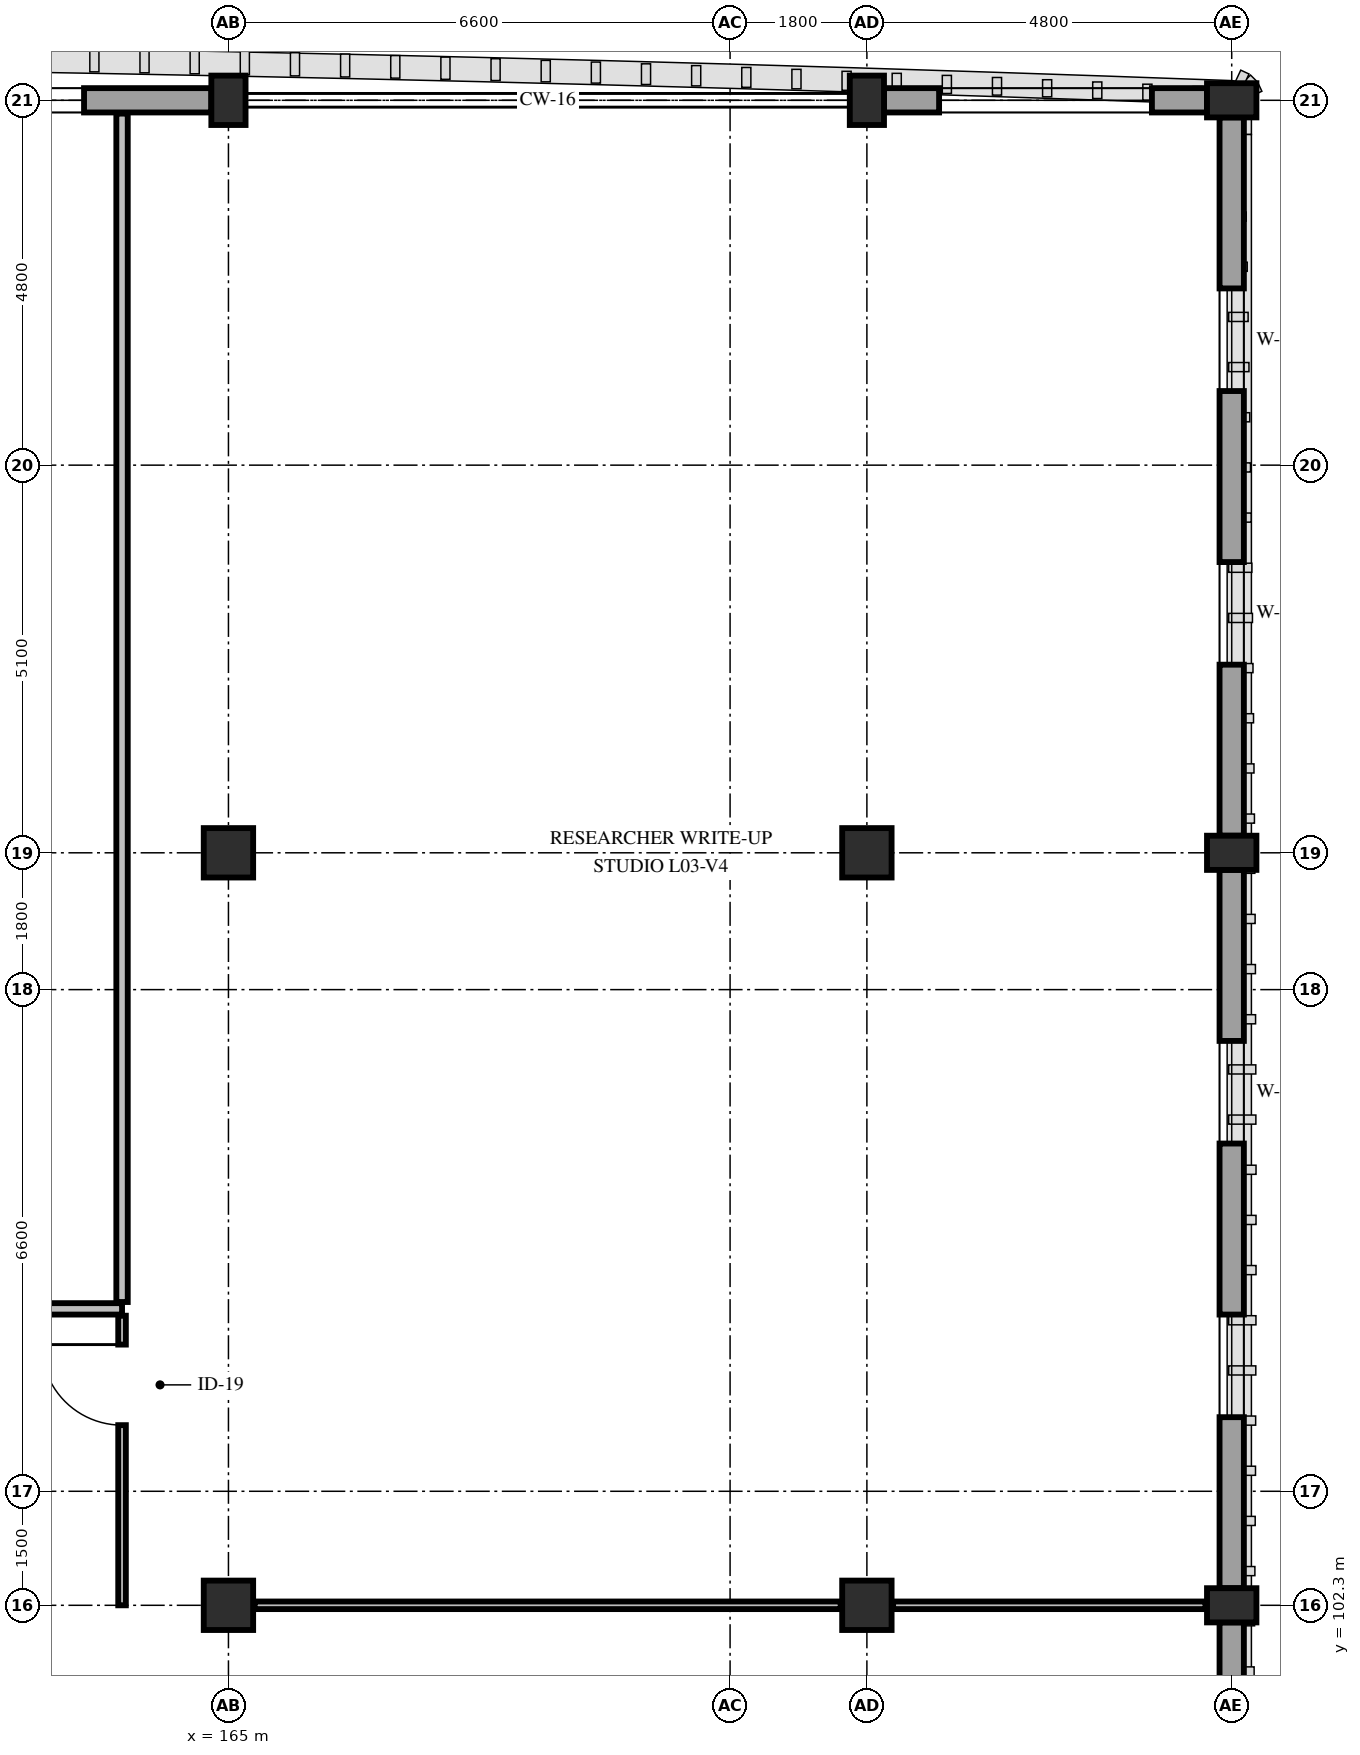
"""IFC4 building model, lengths in metres.
Left out: names, types, materials, properties, quantities, classifications, styles, units other than length and angle.
Written with IfcOpenShell. Run it as: python <this file> out.ifc"""

import sys

from ifc_helpers import new_model, si_unit, direction, frame, frame_2d, origin, origin_2d, place, context, subcontext, project, spatial, rectangle, extrude, element, fill, save


model = new_model("IFC4")
c1 = context("Model", 3, precision=1e-05, world=origin(), true_north=direction((0.0, 1.0)))
c2 = subcontext(c1, "Body", "Model", "MODEL_VIEW")
j1 = project(units=[si_unit("LENGTHUNIT", "METRE"), si_unit("PLANEANGLEUNIT", "RADIAN")], contexts=[c1])
p1 = place(None, origin())
s1 = spatial("IfcSite", under=j1, at=p1, CompositionType="ELEMENT")
p2 = place(p1, origin())
s2 = spatial("IfcBuilding", under=s1, at=p2, CompositionType="ELEMENT")
p3 = place(p2, frame((0.0, 0.0, 15.0)))
s3 = spatial("IfcBuildingStorey", under=s2, at=p3, CompositionType="ELEMENT", Elevation=15.0)
for number, where, z_axis, x_axis in (
    (1, (165.0, 102.3, 0.0), (0.0, 0.0, 1.0), (1.0, 0.0, 0.0)),
    (2, (165.0, 112.2, 0.0), (0.0, 0.0, 1.0), (1.0, 0.0, 0.0)),
):
    element("IfcColumn", number, at=place(p3, frame(where, z_axis=z_axis, x_axis=x_axis)), inside=s3, PredefinedType="COLUMN", context=c2, shape_type="SweptSolid", body=[
        extrude(rectangle(XDim=0.65, YDim=0.65, at=origin_2d()), origin(), (0.0, 0.0, 1.0), 4.8),
    ])
p4 = place(p3, frame((165.0, 122.1, 0.0), z_axis=(0.0, 0.0, 1.0), x_axis=(1.0, 0.0, 0.0)))
e3 = element("IfcColumn", 3, at=p4, inside=s3, PredefinedType="PILASTER", context=c2, shape_type="SweptSolid", body=[
    extrude(rectangle(XDim=0.45, YDim=0.65, at=origin_2d()), origin(), (0.0, 0.0, 1.0), 4.8),
])
for number, where, z_axis, x_axis in (
    (4, (173.4, 102.3, 0.0), (0.0, 0.0, 1.0), (1.0, 0.0, 0.0)),
    (5, (173.4, 112.2, 0.0), (0.0, 0.0, 1.0), (1.0, 0.0, 0.0)),
):
    element("IfcColumn", number, at=place(p3, frame(where, z_axis=z_axis, x_axis=x_axis)), inside=s3, PredefinedType="COLUMN", context=c2, shape_type="SweptSolid", body=[
        extrude(rectangle(XDim=0.65, YDim=0.65, at=origin_2d()), origin(), (0.0, 0.0, 1.0), 4.8),
    ])
for number, where, z_axis, x_axis in (
    (6, (173.4, 122.1, 0.0), (0.0, 0.0, 1.0), (1.0, 0.0, 0.0)),
    (7, (178.2, 102.3, 0.0), (0.0, 0.0, 1.0), (0.0, 1.0, 0.0)),
    (8, (178.2, 112.2, 0.0), (0.0, 0.0, 1.0), (0.0, 1.0, 0.0)),
    (9, (178.2, 122.1, 0.0), (0.0, 0.0, 1.0), (0.0, 1.0, 0.0)),
):
    element("IfcColumn", number, at=place(p3, frame(where, z_axis=z_axis, x_axis=x_axis)), inside=s3, PredefinedType="PILASTER", context=c2, shape_type="SweptSolid", body=[
        extrude(rectangle(XDim=0.45, YDim=0.65, at=origin_2d()), origin(), (0.0, 0.0, 1.0), 4.8),
    ])
p5 = place(p3, frame((158.625, 122.1, 0.0), z_axis=(0.0, 0.0, 1.0), x_axis=(1.0, 0.0, 0.0)))
e10 = element("IfcWall", 10, at=p5, inside=s3, PredefinedType="STANDARD", context=c2, shape_type="SweptSolid", body=[
    extrude(rectangle(XDim=6.15, YDim=0.32, at=frame_2d((3.075, 0.0))), origin(), (0.0, 0.0, 1.0), 3.78),
])
p6 = place(p5, frame((1.675, 0.0, 0.85)))
e11 = element("IfcOpeningElement", 11, at=p6, cuts=e10, PredefinedType="OPENING", context=c2, shape_type="SweptSolid", body=[
    extrude(rectangle(XDim=2.8, YDim=1.88, at=frame_2d((1.4, 0.94))), frame((0.0, 0.175, 0.0), z_axis=(0.0, -1.0, 0.0), x_axis=(1.0, 0.0, 0.0)), (0.0, 0.0, 1.0), 0.35),
])
p7 = place(p3, frame((173.625, 122.1, 0.0), z_axis=(0.0, 0.0, 1.0), x_axis=(1.0, 0.0, 0.0)))
e12 = element("IfcWall", 12, at=p7, inside=s3, PredefinedType="STANDARD", context=c2, shape_type="SweptSolid", body=[
    extrude(rectangle(XDim=4.25, YDim=0.32, at=frame_2d((2.125, 0.0))), origin(), (0.0, 0.0, 1.0), 3.78),
])
p8 = place(p7, frame((0.725, 0.0, 0.85)))
e13 = element("IfcOpeningElement", 13, at=p8, cuts=e12, PredefinedType="OPENING", context=c2, shape_type="SweptSolid", body=[
    extrude(rectangle(XDim=2.8, YDim=1.88, at=frame_2d((1.4, 0.94))), frame((0.0, 0.175, 0.0), z_axis=(0.0, -1.0, 0.0), x_axis=(1.0, 0.0, 0.0)), (0.0, 0.0, 1.0), 0.35),
])
p9 = place(p3, frame((178.2, 121.875, 0.0), z_axis=(0.0, 0.0, 1.0), x_axis=(0.0, -1.0, 0.0)))
e14 = element("IfcWall", 14, at=p9, inside=s3, PredefinedType="STANDARD", context=c2, shape_type="SweptSolid", body=[
    extrude(rectangle(XDim=9.45, YDim=0.32, at=frame_2d((4.725, 0.0))), origin(), (0.0, 0.0, 1.0), 3.95),
])
p10 = place(p9, frame((2.25, 0.0, 0.85)))
e15 = element("IfcOpeningElement", 15, at=p10, cuts=e14, PredefinedType="OPENING", context=c2, shape_type="SweptSolid", body=[
    extrude(rectangle(XDim=1.35, YDim=2.08, at=frame_2d((0.675, 1.04))), frame((0.0, 0.175, 0.0), z_axis=(0.0, -1.0, 0.0), x_axis=(1.0, 0.0, 0.0)), (0.0, 0.0, 1.0), 0.35),
])
p11 = place(p9, frame((5.85, 0.0, 0.85)))
e16 = element("IfcOpeningElement", 16, at=p11, cuts=e14, PredefinedType="OPENING", context=c2, shape_type="SweptSolid", body=[
    extrude(rectangle(XDim=1.35, YDim=2.08, at=frame_2d((0.675, 1.04))), frame((0.0, 0.175, 0.0), z_axis=(0.0, -1.0, 0.0), x_axis=(1.0, 0.0, 0.0)), (0.0, 0.0, 1.0), 0.35),
])
p12 = place(p3, frame((178.2, 111.975, 0.0), z_axis=(0.0, 0.0, 1.0), x_axis=(0.0, -1.0, 0.0)))
e17 = element("IfcWall", 17, at=p12, inside=s3, PredefinedType="STANDARD", context=c2, shape_type="SweptSolid", body=[
    extrude(rectangle(XDim=9.45, YDim=0.32, at=frame_2d((4.725, 0.0))), origin(), (0.0, 0.0, 1.0), 3.95),
])
p13 = place(p12, frame((2.25, 0.0, 0.85)))
e18 = element("IfcOpeningElement", 18, at=p13, cuts=e17, PredefinedType="OPENING", context=c2, shape_type="SweptSolid", body=[
    extrude(rectangle(XDim=1.35, YDim=2.08, at=frame_2d((0.675, 1.04))), frame((0.0, 0.175, 0.0), z_axis=(0.0, -1.0, 0.0), x_axis=(1.0, 0.0, 0.0)), (0.0, 0.0, 1.0), 0.35),
])
p14 = place(p12, frame((5.85, 0.0, 0.85)))
e19 = element("IfcOpeningElement", 19, at=p14, cuts=e17, PredefinedType="OPENING", context=c2, shape_type="SweptSolid", body=[
    extrude(rectangle(XDim=1.35, YDim=2.08, at=frame_2d((0.675, 1.04))), frame((0.0, 0.175, 0.0), z_axis=(0.0, -1.0, 0.0), x_axis=(1.0, 0.0, 0.0)), (0.0, 0.0, 1.0), 0.35),
])
p15 = place(p3, frame((178.2, 102.075, 0.0), z_axis=(0.0, 0.0, 1.0), x_axis=(0.0, -1.0, 0.0)))
e20 = element("IfcWall", 20, at=p15, inside=s3, PredefinedType="STANDARD", context=c2, shape_type="SweptSolid", body=[
    extrude(rectangle(XDim=9.45, YDim=0.32, at=frame_2d((4.725, 0.0))), origin(), (0.0, 0.0, 1.0), 3.95),
])
p16 = place(p15, frame((2.25, 0.0, 0.85)))
e21 = element("IfcOpeningElement", 21, at=p16, cuts=e20, PredefinedType="OPENING", context=c2, shape_type="SweptSolid", body=[
    extrude(rectangle(XDim=1.35, YDim=2.08, at=frame_2d((0.675, 1.04))), frame((0.0, 0.175, 0.0), z_axis=(0.0, -1.0, 0.0), x_axis=(1.0, 0.0, 0.0)), (0.0, 0.0, 1.0), 0.35),
])
p17 = place(p15, frame((5.85, 0.0, 0.85)))
e22 = element("IfcOpeningElement", 22, at=p17, cuts=e20, PredefinedType="OPENING", context=c2, shape_type="SweptSolid", body=[
    extrude(rectangle(XDim=1.35, YDim=2.08, at=frame_2d((0.675, 1.04))), frame((0.0, 0.175, 0.0), z_axis=(0.0, -1.0, 0.0), x_axis=(1.0, 0.0, 0.0)), (0.0, 0.0, 1.0), 0.35),
])
p18 = place(p3, frame((151.89, 106.2, 0.0), z_axis=(0.0, 0.0, 1.0), x_axis=(1.0, 0.0, 0.0)))
e23 = element("IfcWall", 23, at=p18, inside=s3, PredefinedType="PARTITIONING", context=c2, shape_type="SweptSolid", body=[
    extrude(rectangle(XDim=11.71, YDim=0.15, at=frame_2d((5.855, 0.0))), origin(), (0.0, 0.0, 1.0), 3.78),
])
p19 = place(p18, frame((7.25, 0.0, 0.0)))
e24 = element("IfcOpeningElement", 24, at=p19, cuts=e23, PredefinedType="OPENING", context=c2, shape_type="SweptSolid", body=[
    extrude(rectangle(XDim=1.62, YDim=2.3, at=frame_2d((0.81, 1.15))), frame((0.0, 0.09, 0.0), z_axis=(0.0, -1.0, 0.0), x_axis=(1.0, 0.0, 0.0)), (0.0, 0.0, 1.0), 0.18),
])
p20 = place(p3, frame((163.6, 106.29, 0.0), z_axis=(0.0, 0.0, 1.0), x_axis=(0.0, 1.0, 0.0)))
e25 = element("IfcWall", 25, at=p20, inside=s3, PredefinedType="PARTITIONING", context=c2, shape_type="SweptSolid", body=[
    extrude(rectangle(XDim=15.635, YDim=0.15, at=frame_2d((7.817, 0.0))), origin(), (0.0, 0.0, 1.0), 3.93),
])
p21 = place(p3, frame((165.345, 102.3, 0.0), z_axis=(0.0, 0.0, 1.0), x_axis=(1.0, 0.0, 0.0)))
e26 = element("IfcWall", 26, at=p21, inside=s3, PredefinedType="PARTITIONING", context=c2, shape_type="SweptSolid", body=[
    extrude(rectangle(XDim=7.71, YDim=0.1, at=frame_2d((3.855, 0.0))), origin(), (0.0, 0.0, 1.0), 3.83),
])
p22 = place(p3, frame((173.745, 102.3, 0.0), z_axis=(0.0, 0.0, 1.0), x_axis=(1.0, 0.0, 0.0)))
e27 = element("IfcWall", 27, at=p22, inside=s3, PredefinedType="PARTITIONING", context=c2, shape_type="SweptSolid", body=[
    extrude(rectangle(XDim=4.11, YDim=0.1, at=frame_2d((2.055, 0.0))), origin(), (0.0, 0.0, 1.0), 4.065),
])
p23 = place(p3, frame((163.6, 102.3, 0.0), z_axis=(0.0, 0.0, 1.0), x_axis=(0.0, 1.0, 0.0)))
e28 = element("IfcWall", 28, at=p23, inside=s3, PredefinedType="PARTITIONING", context=c2, shape_type="SweptSolid", body=[
    extrude(rectangle(XDim=3.81, YDim=0.1, at=frame_2d((1.905, 0.0))), origin(), (0.0, 0.0, 1.0), 4.065),
])
p24 = place(p23, frame((2.37, 0.0, 0.0)))
e29 = element("IfcOpeningElement", 29, at=p24, cuts=e28, PredefinedType="OPENING", context=c2, shape_type="SweptSolid", body=[
    extrude(rectangle(XDim=1.06, YDim=2.2, at=frame_2d((0.53, 1.1))), frame((0.0, 0.065, 0.0), z_axis=(0.0, -1.0, 0.0), x_axis=(1.0, 0.0, 0.0)), (0.0, 0.0, 1.0), 0.13),
])
p25 = place(p6, origin())
e30 = element("IfcWindow", 30, at=p25, inside=s3, PartitioningType="DOUBLE_PANEL_VERTICAL", PredefinedType="WINDOW", context=c2, shape_type="SweptSolid", body=[
    extrude(rectangle(XDim=2.8, YDim=1.88, at=frame_2d((1.4, 0.94))), frame((0.0, 0.03, 0.0), z_axis=(0.0, -1.0, 0.0), x_axis=(1.0, 0.0, 0.0)), (0.0, 0.0, 1.0), 0.06),
])
fill(e11, e30)
p26 = place(p8, origin())
e31 = element("IfcWindow", 31, at=p26, inside=s3, PartitioningType="DOUBLE_PANEL_VERTICAL", PredefinedType="WINDOW", context=c2, shape_type="SweptSolid", body=[
    extrude(rectangle(XDim=2.8, YDim=1.88, at=frame_2d((1.4, 0.94))), frame((0.0, 0.03, 0.0), z_axis=(0.0, -1.0, 0.0), x_axis=(1.0, 0.0, 0.0)), (0.0, 0.0, 1.0), 0.06),
])
fill(e13, e31)
p27 = place(p10, origin())
e32 = element("IfcWindow", 32, at=p27, inside=s3, PartitioningType="SINGLE_PANEL", PredefinedType="WINDOW", context=c2, shape_type="SweptSolid", body=[
    extrude(rectangle(XDim=1.35, YDim=2.08, at=frame_2d((0.675, 1.04))), frame((0.0, 0.03, 0.0), z_axis=(0.0, -1.0, 0.0), x_axis=(1.0, 0.0, 0.0)), (0.0, 0.0, 1.0), 0.06),
])
fill(e15, e32)
p28 = place(p11, origin())
e33 = element("IfcWindow", 33, at=p28, inside=s3, PartitioningType="SINGLE_PANEL", PredefinedType="WINDOW", context=c2, shape_type="SweptSolid", body=[
    extrude(rectangle(XDim=1.35, YDim=2.08, at=frame_2d((0.675, 1.04))), frame((0.0, 0.03, 0.0), z_axis=(0.0, -1.0, 0.0), x_axis=(1.0, 0.0, 0.0)), (0.0, 0.0, 1.0), 0.06),
])
fill(e16, e33)
p29 = place(p13, origin())
e34 = element("IfcWindow", 34, at=p29, inside=s3, PartitioningType="SINGLE_PANEL", PredefinedType="WINDOW", context=c2, shape_type="SweptSolid", body=[
    extrude(rectangle(XDim=1.35, YDim=2.08, at=frame_2d((0.675, 1.04))), frame((0.0, 0.03, 0.0), z_axis=(0.0, -1.0, 0.0), x_axis=(1.0, 0.0, 0.0)), (0.0, 0.0, 1.0), 0.06),
])
fill(e18, e34)
p30 = place(p14, origin())
e35 = element("IfcWindow", 35, at=p30, inside=s3, PartitioningType="SINGLE_PANEL", PredefinedType="WINDOW", context=c2, shape_type="SweptSolid", body=[
    extrude(rectangle(XDim=1.35, YDim=2.08, at=frame_2d((0.675, 1.04))), frame((0.0, 0.03, 0.0), z_axis=(0.0, -1.0, 0.0), x_axis=(1.0, 0.0, 0.0)), (0.0, 0.0, 1.0), 0.06),
])
fill(e19, e35)
p31 = place(p24, origin())
e36 = element("IfcDoor", 36, at=p31, inside=s3, OperationType="SINGLE_SWING_RIGHT", PredefinedType="DOOR", context=c2, shape_type="SweptSolid", body=[
    extrude(rectangle(XDim=1.06, YDim=2.2, at=frame_2d((0.53, 1.1))), frame((0.0, 0.025, 0.0), z_axis=(0.0, -1.0, 0.0), x_axis=(1.0, 0.0, 0.0)), (0.0, 0.0, 1.0), 0.05),
])
fill(e29, e36)
save(model, sys.argv[1])
